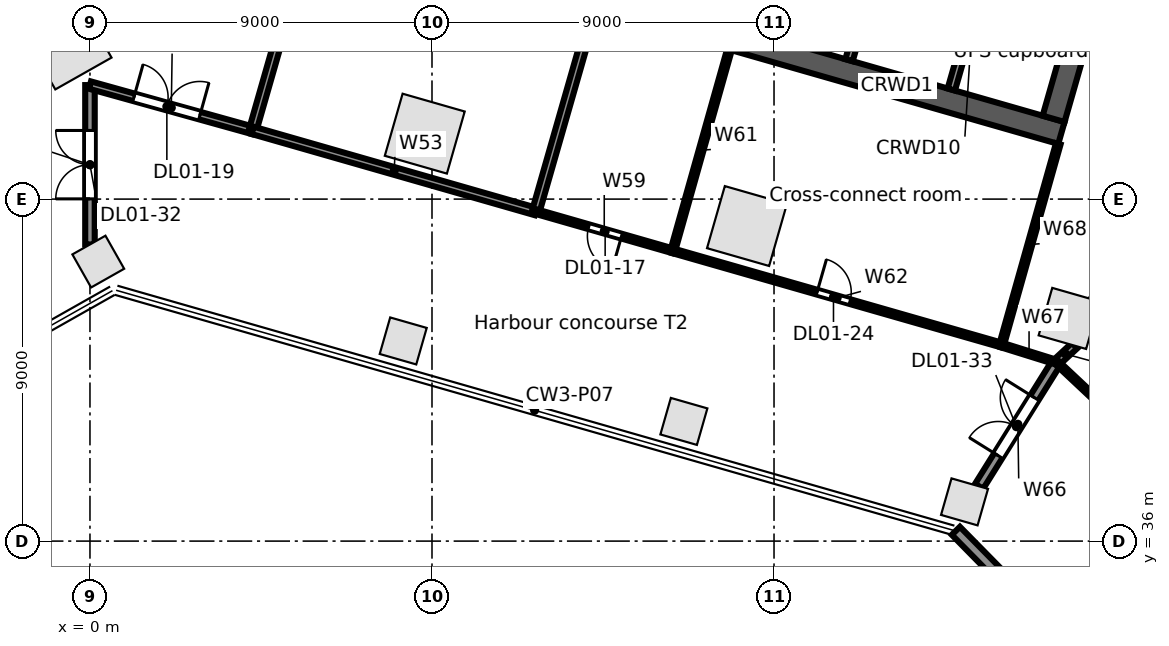
"""IFC4 building model, lengths in metres.
Left out: names, types, materials, properties, quantities, classifications, styles, units other than length and angle.
Written with IfcOpenShell. Run it as: python <this file> out.ifc"""

import sys

from ifc_helpers import new_model, si_unit, direction, frame, frame_2d, origin, origin_2d, place, context, subcontext, project, spatial, rectangle, extrude, element, fill, save


model = new_model("IFC4")
c1 = context("Model", 3, precision=1e-05, world=origin(), true_north=direction((0.0, 1.0)))
c2 = subcontext(c1, "Body", "Model", "MODEL_VIEW")
j1 = project(units=[si_unit("LENGTHUNIT", "METRE"), si_unit("PLANEANGLEUNIT", "RADIAN")], contexts=[c1])
p1 = place(None, origin())
s1 = spatial("IfcSite", under=j1, at=p1, CompositionType="ELEMENT")
p2 = place(p1, origin())
s2 = spatial("IfcBuilding", under=s1, at=p2, CompositionType="ELEMENT")
p3 = place(p2, frame((0.0, 0.0, 11.5)))
s3 = spatial("IfcBuildingStorey", under=s2, at=p3, CompositionType="ELEMENT", Elevation=11.5)
for number, where, z_axis, x_axis in (
    (1, (-0.591, 49.044, 0.0), (0.0, 0.0, 1.0), (0.87, 0.492, 0.0)),
    (2, (8.81, 46.722, 0.0), (0.0, 0.0, 1.0), (0.961, -0.276, 0.0)),
    (3, (17.288, 44.291, 0.0), (0.0, 0.0, 1.0), (0.961, -0.276, 0.0)),
):
    element("IfcColumn", number, at=place(p3, frame(where, z_axis=z_axis, x_axis=x_axis)), inside=s3, PredefinedType="COLUMN", context=c2, shape_type="SweptSolid", body=[
        extrude(rectangle(XDim=1.7, YDim=1.7, at=origin_2d()), origin(), (0.0, 0.0, 1.0), 5.0),
    ])
p4 = place(p3, frame((25.767, 41.86, 0.0), z_axis=(0.0, 0.0, 1.0), x_axis=(0.961261695938, -0.275637355817, 0.0)))
e4 = element("IfcColumn", 4, at=p4, inside=s3, PredefinedType="COLUMN", context=c2, shape_type="SweptSolid", body=[
    extrude(rectangle(XDim=1.3, YDim=1.3, at=origin_2d()), origin(), (0.0, 0.0, 1.0), 5.0),
])
for number, where, z_axis, x_axis in (
    (5, (0.219, 43.355, 0.0), (0.0, 0.0, 1.0), (0.87, 0.492, 0.0)),
    (6, (8.243, 41.267, 0.0), (0.0, 0.0, 1.0), (0.961, -0.276, 0.0)),
    (7, (15.628, 39.149, 0.0), (0.0, 0.0, 1.0), (0.961, -0.276, 0.0)),
    (8, (23.013, 37.032, 0.0), (0.0, 0.0, 1.0), (0.961, -0.276, 0.0)),
):
    element("IfcColumn", number, at=place(p3, frame(where, z_axis=z_axis, x_axis=x_axis)), inside=s3, PredefinedType="COLUMN", context=c2, shape_type="SweptSolid", body=[
        extrude(rectangle(XDim=1.0, YDim=1.0, at=origin_2d()), origin(), (0.0, 0.0, 1.0), 5.0),
    ])
p5 = place(p3, frame((36.376, 22.44, 0.0), z_axis=(0.0, 0.0, 1.0), x_axis=(-0.700917061273, 0.713242787006, 0.0)))
e9 = element("IfcWall", 9, at=p5, inside=s3, PredefinedType="STANDARD", context=c2, shape_type="SweptSolid", body=[
    extrude(rectangle(XDim=19.391, YDim=0.3, at=frame_2d((9.696, 0.0))), origin(), (0.0, 0.0, 1.0), 4.65),
])
p6 = place(p3, frame((16.911, 49.221, 0.0), z_axis=(0.0, 0.0, 1.0), x_axis=(0.96126248289, -0.275634611374, 0.0)))
e10 = element("IfcWall", 10, at=p6, inside=s3, PredefinedType="SOLIDWALL", context=c2, shape_type="SweptSolid", body=[
    extrude(rectangle(XDim=9.0, YDim=0.6, at=frame_2d((4.5, 0.0))), origin(), (0.0, 0.0, 1.0), 4.65),
])
p7 = place(p3, frame((19.973, 48.655, 0.0), z_axis=(0.0, 0.0, 1.0), x_axis=(0.275668441653, 0.961252781674, 0.0)))
e11 = element("IfcWall", 11, at=p7, inside=s3, PredefinedType="SOLIDWALL", context=c2, shape_type="SweptSolid", body=[
    extrude(rectangle(XDim=4.05, YDim=0.2, at=frame_2d((2.025, 0.0))), origin(), (0.0, 0.0, 1.0), 4.65),
])
p8 = place(p3, frame((22.665, 47.883, 0.0), z_axis=(0.0, 0.0, 1.0), x_axis=(0.275596769212, 0.961273333033, 0.0)))
e12 = element("IfcWall", 12, at=p8, inside=s3, PredefinedType="PARTITIONING", context=c2, shape_type="SweptSolid", body=[
    extrude(rectangle(XDim=4.05, YDim=0.2, at=frame_2d((2.025, 0.0))), origin(), (0.0, 0.0, 1.0), 4.65),
])
p9 = place(p3, frame((25.356, 47.112, 0.0), z_axis=(0.0, 0.0, 1.0), x_axis=(0.275631631629, 0.961263337304, 0.0)))
e13 = element("IfcWall", 13, at=p9, inside=s3, PredefinedType="SOLIDWALL", context=c2, shape_type="SweptSolid", body=[
    extrude(rectangle(XDim=10.8, YDim=0.6, at=frame_2d((5.4, 0.0))), origin(), (0.0, 0.0, 1.0), 4.65),
])
p10 = place(p9, frame((4.8, 0.0, 0.0)))
e14 = element("IfcOpeningElement", 14, at=p10, cuts=e13, PredefinedType="OPENING", context=c2, shape_type="SweptSolid", body=[
    extrude(rectangle(XDim=1.2, YDim=2.1, at=frame_2d((0.6, 1.05))), frame((0.0, 0.31, 0.0), z_axis=(0.0, -1.0, 0.0), x_axis=(1.0, 0.0, 0.0)), (0.0, 0.0, 1.0), 0.62),
])
p11 = place(p3, frame((0.0, 43.806, 0.0), z_axis=(0.0, 0.0, 1.0), x_axis=(0.0, 1.0, 0.0)))
e15 = element("IfcWall", 15, at=p11, inside=s3, PredefinedType="PARTITIONING", context=c2, shape_type="SweptSolid", body=[
    extrude(rectangle(XDim=4.194, YDim=0.25, at=frame_2d((2.097, 0.0))), origin(), (0.0, 0.0, 1.0), 3.712),
])
p12 = place(p11, frame((1.2, 0.0, 0.0)))
e16 = element("IfcOpeningElement", 16, at=p12, cuts=e15, PredefinedType="OPENING", context=c2, shape_type="SweptSolid", body=[
    extrude(rectangle(XDim=1.8, YDim=2.1, at=frame_2d((0.9, 1.05))), frame((0.0, 0.135, 0.0), z_axis=(0.0, -1.0, 0.0), x_axis=(1.0, 0.0, 0.0)), (0.0, 0.0, 1.0), 0.27),
])
p13 = place(p3, frame((0.0, 48.0, 0.0), z_axis=(0.0, 0.0, 1.0), x_axis=(0.963400508162, -0.268066150181, 0.0)))
e17 = element("IfcWall", 17, at=p13, inside=s3, PredefinedType="PARTITIONING", context=c2, shape_type="SweptSolid", body=[
    extrude(rectangle(XDim=4.443, YDim=0.2, at=frame_2d((2.221, 0.0))), origin(), (0.0, 0.0, 1.0), 4.65),
])
p14 = place(p13, frame((1.2, 0.0, 0.0)))
e18 = element("IfcOpeningElement", 18, at=p14, cuts=e17, PredefinedType="OPENING", context=c2, shape_type="SweptSolid", body=[
    extrude(rectangle(XDim=1.8, YDim=2.1, at=frame_2d((0.9, 1.05))), frame((0.0, 0.11, 0.0), z_axis=(0.0, -1.0, 0.0), x_axis=(1.0, 0.0, 0.0)), (0.0, 0.0, 1.0), 0.22),
])
p15 = place(p3, frame((4.28, 46.809, 0.0), z_axis=(0.0, 0.0, 1.0), x_axis=(0.275635044812, 0.961262358605, 0.0)))
e19 = element("IfcWall", 19, at=p15, inside=s3, PredefinedType="PARTITIONING", context=c2, shape_type="SweptSolid", body=[
    extrude(rectangle(XDim=11.5, YDim=0.2, at=frame_2d((5.75, 0.0))), origin(), (0.0, 0.0, 1.0), 3.712),
])
p16 = place(p3, frame((4.28, 46.809, 0.0), z_axis=(0.0, 0.0, 1.0), x_axis=(0.961270337968, -0.275607215693, 0.0)))
e20 = element("IfcWall", 20, at=p16, inside=s3, PredefinedType="PARTITIONING", context=c2, shape_type="SweptSolid", body=[
    extrude(rectangle(XDim=7.75, YDim=0.2, at=frame_2d((3.875, 0.0))), origin(), (0.0, 0.0, 1.0), 4.03),
])
p17 = place(p3, frame((11.73, 44.673, 0.0), z_axis=(0.0, 0.0, 1.0), x_axis=(0.275635044812, 0.961262358605, 0.0)))
e21 = element("IfcWall", 21, at=p17, inside=s3, PredefinedType="PARTITIONING", context=c2, shape_type="SweptSolid", body=[
    extrude(rectangle(XDim=11.5, YDim=0.2, at=frame_2d((5.75, 0.0))), origin(), (0.0, 0.0, 1.0), 3.712),
])
p18 = place(p17, frame((4.95, 0.0, 0.0)))
e22 = element("IfcOpeningElement", 22, at=p18, cuts=e21, PredefinedType="OPENING", context=c2, shape_type="SweptSolid", body=[
    extrude(rectangle(XDim=1.8, YDim=2.1, at=frame_2d((0.9, 1.05))), frame((0.0, 0.11, 0.0), z_axis=(0.0, -1.0, 0.0), x_axis=(1.0, 0.0, 0.0)), (0.0, 0.0, 1.0), 0.22),
])
p19 = place(p3, frame((11.73, 44.673, 0.0), z_axis=(0.0, 0.0, 1.0), x_axis=(0.961228613303, -0.275752702557, 0.0)))
e23 = element("IfcWall", 23, at=p19, inside=s3, PredefinedType="PARTITIONING", context=c2, shape_type="SweptSolid", body=[
    extrude(rectangle(XDim=3.75, YDim=0.125, at=frame_2d((1.875, 0.0))), origin(), (0.0, 0.0, 1.0), 4.65),
])
p20 = place(p19, frame((1.45, 0.0, 0.0)))
e24 = element("IfcOpeningElement", 24, at=p20, cuts=e23, PredefinedType="OPENING", context=c2, shape_type="SweptSolid", body=[
    extrude(rectangle(XDim=0.9, YDim=2.1, at=frame_2d((0.45, 1.05))), frame((0.0, 0.073, 0.0), z_axis=(0.0, -1.0, 0.0), x_axis=(1.0, 0.0, 0.0)), (0.0, 0.0, 1.0), 0.145),
])
p21 = place(p3, frame((15.335, 43.639, 0.0), z_axis=(0.0, 0.0, 1.0), x_axis=(0.271407455373, 0.962464541252, 0.0)))
e25 = element("IfcWall", 25, at=p21, inside=s3, PredefinedType="PARTITIONING", context=c2, shape_type="SweptSolid", body=[
    extrude(rectangle(XDim=5.501, YDim=0.125, at=frame_2d((2.75, 0.0))), origin(), (0.0, 0.0, 1.0), 3.93),
])
p22 = place(p3, frame((15.335, 43.639, 0.0), z_axis=(0.0, 0.0, 1.0), x_axis=(0.961281982754, -0.275566597455, 0.0)))
e26 = element("IfcWall", 26, at=p22, inside=s3, PredefinedType="PARTITIONING", context=c2, shape_type="SweptSolid", body=[
    extrude(rectangle(XDim=9.0, YDim=0.125, at=frame_2d((4.5, 0.0))), origin(), (0.0, 0.0, 1.0), 3.822),
])
p23 = place(p22, frame((3.95, 0.0, 0.0)))
e27 = element("IfcOpeningElement", 27, at=p23, cuts=e26, PredefinedType="OPENING", context=c2, shape_type="SweptSolid", body=[
    extrude(rectangle(XDim=0.9, YDim=2.1, at=frame_2d((0.45, 1.05))), frame((0.0, 0.073, 0.0), z_axis=(0.0, -1.0, 0.0), x_axis=(1.0, 0.0, 0.0)), (0.0, 0.0, 1.0), 0.145),
])
p24 = place(p3, frame((23.397, 37.442, 0.0), z_axis=(0.0, 0.0, 1.0), x_axis=(0.529805058875, 0.848119448893, 0.0)))
e28 = element("IfcWall", 28, at=p24, inside=s3, PredefinedType="PARTITIONING", context=c2, shape_type="SweptSolid", body=[
    extrude(rectangle(XDim=3.849, YDim=0.25, at=frame_2d((1.924, 0.0))), origin(), (0.0, 0.0, 1.0), 3.712),
])
p25 = place(p24, frame((0.95, 0.0, 0.0)))
e29 = element("IfcOpeningElement", 29, at=p25, cuts=e28, PredefinedType="OPENING", context=c2, shape_type="SweptSolid", body=[
    extrude(rectangle(XDim=1.8, YDim=2.1, at=frame_2d((0.9, 1.05))), frame((0.0, 0.135, 0.0), z_axis=(0.0, -1.0, 0.0), x_axis=(1.0, 0.0, 0.0)), (0.0, 0.0, 1.0), 0.27),
])
p26 = place(p3, frame((23.986, 41.159, 0.0), z_axis=(0.0, 0.0, 1.0), x_axis=(0.954522865266, -0.298137719325, 0.0)))
e30 = element("IfcWall", 30, at=p26, inside=s3, PredefinedType="PARTITIONING", context=c2, shape_type="SweptSolid", body=[
    extrude(rectangle(XDim=1.519, YDim=0.125, at=frame_2d((0.76, 0.0))), origin(), (0.0, 0.0, 1.0), 3.712),
])
p27 = place(p3, frame((23.986, 41.159, 0.0), z_axis=(0.0, 0.0, 1.0), x_axis=(0.271465437068, 0.962448188983, 0.0)))
e31 = element("IfcWall", 31, at=p27, inside=s3, PredefinedType="PARTITIONING", context=c2, shape_type="SweptSolid", body=[
    extrude(rectangle(XDim=5.5, YDim=0.125, at=frame_2d((2.75, 0.0))), origin(), (0.0, 0.0, 1.0), 3.93),
])
p28 = place(p3, frame((25.436, 40.706, 0.0), z_axis=(0.0, 0.0, 1.0), x_axis=(0.733725630695, 0.679445876329, 0.0)))
e32 = element("IfcWall", 32, at=p28, inside=s3, PredefinedType="PARTITIONING", context=c2, shape_type="SweptSolid", body=[
    extrude(rectangle(XDim=0.643, YDim=0.2, at=frame_2d((0.322, 0.0))), origin(), (0.0, 0.0, 1.0), 4.65),
])
p29 = place(p3, frame((25.436, 40.706, 0.0), z_axis=(0.0, 0.0, 1.0), x_axis=(0.729011488135, -0.684501461041, 0.0)))
e33 = element("IfcWall", 33, at=p29, inside=s3, PredefinedType="PARTITIONING", context=c2, shape_type="SweptSolid", body=[
    extrude(rectangle(XDim=4.202, YDim=0.125, at=frame_2d((2.101, 0.0))), origin(), (0.0, 0.0, 1.0), 4.65),
])
p30 = place(p29, frame((1.7, 0.0, 0.0)))
e34 = element("IfcOpeningElement", 34, at=p30, cuts=e33, PredefinedType="OPENING", context=c2, shape_type="SweptSolid", body=[
    extrude(rectangle(XDim=0.9, YDim=2.1, at=frame_2d((0.45, 1.05))), frame((0.0, 0.073, 0.0), z_axis=(0.0, -1.0, 0.0), x_axis=(1.0, 0.0, 0.0)), (0.0, 0.0, 1.0), 0.145),
])
p31 = place(p20, frame((0.9, 0.0, 0.0), z_axis=(0.0, 0.0, 1.0), x_axis=(-1.0, 0.0, 0.0)))
e35 = element("IfcDoor", 35, at=p31, inside=s3, OperationType="SINGLE_SWING_LEFT", PredefinedType="DOOR", context=c2, shape_type="SweptSolid", body=[
    extrude(rectangle(XDim=0.9, YDim=2.1, at=frame_2d((0.45, 1.05))), frame((0.0, 0.025, 0.0), z_axis=(0.0, -1.0, 0.0), x_axis=(1.0, 0.0, 0.0)), (0.0, 0.0, 1.0), 0.05),
])
fill(e24, e35)
p32 = place(p14, origin())
e36 = element("IfcDoor", 36, at=p32, inside=s3, OperationType="DOUBLE_DOOR_SINGLE_SWING", PredefinedType="DOOR", context=c2, shape_type="SweptSolid", body=[
    extrude(rectangle(XDim=1.8, YDim=2.1, at=frame_2d((0.9, 1.05))), frame((0.0, 0.025, 0.0), z_axis=(0.0, -1.0, 0.0), x_axis=(1.0, 0.0, 0.0)), (0.0, 0.0, 1.0), 0.05),
])
fill(e18, e36)
p33 = place(p23, origin())
e37 = element("IfcDoor", 37, at=p33, inside=s3, OperationType="SINGLE_SWING_LEFT", PredefinedType="DOOR", context=c2, shape_type="SweptSolid", body=[
    extrude(rectangle(XDim=0.9, YDim=2.1, at=frame_2d((0.45, 1.05))), frame((0.0, 0.025, 0.0), z_axis=(0.0, -1.0, 0.0), x_axis=(1.0, 0.0, 0.0)), (0.0, 0.0, 1.0), 0.05),
])
fill(e27, e37)
p34 = place(p12, origin())
e38 = element("IfcDoor", 38, at=p34, inside=s3, OperationType="DOUBLE_DOOR_SINGLE_SWING", PredefinedType="DOOR", context=c2, shape_type="SweptSolid", body=[
    extrude(rectangle(XDim=1.8, YDim=2.1, at=frame_2d((0.9, 1.05))), frame((0.0, 0.025, 0.0), z_axis=(0.0, -1.0, 0.0), x_axis=(1.0, 0.0, 0.0)), (0.0, 0.0, 1.0), 0.05),
])
fill(e16, e38)
p35 = place(p25, origin())
e39 = element("IfcDoor", 39, at=p35, inside=s3, OperationType="DOUBLE_DOOR_SINGLE_SWING", PredefinedType="DOOR", context=c2, shape_type="SweptSolid", body=[
    extrude(rectangle(XDim=1.8, YDim=2.1, at=frame_2d((0.9, 1.05))), frame((0.0, 0.025, 0.0), z_axis=(0.0, -1.0, 0.0), x_axis=(1.0, 0.0, 0.0)), (0.0, 0.0, 1.0), 0.05),
])
fill(e29, e39)
save(model, sys.argv[1])
